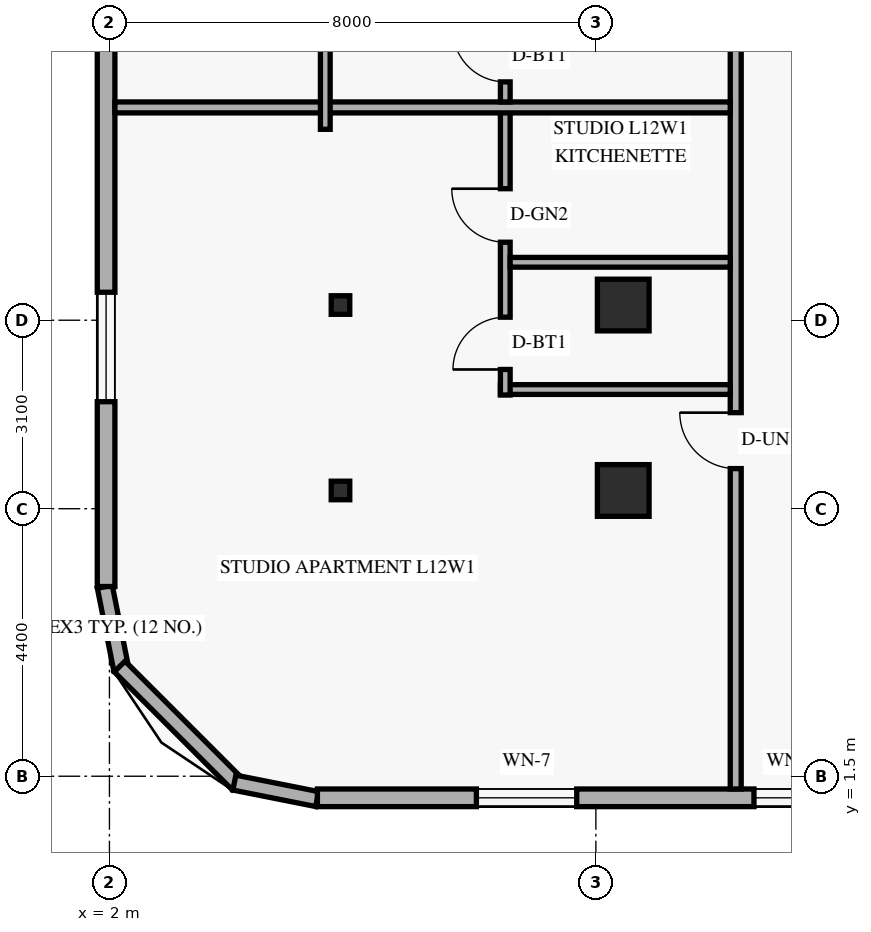
"""IFC4 building model, lengths in metres.
Left out: names, types, materials, properties, quantities, classifications, styles, units other than length and angle.
Written with IfcOpenShell. Run it as: python <this file> out.ifc"""

import sys

from ifc_helpers import new_model, si_unit, direction, frame, frame_2d, origin, origin_2d, place, context, subcontext, project, spatial, rectangle, hollow_rectangle, extrude, element, fill, save


model = new_model("IFC4")
c1 = context("Model", 3, precision=1e-05, world=origin(), true_north=direction((0.0, 1.0)))
c2 = subcontext(c1, "Body", "Model", "MODEL_VIEW")
j1 = project(units=[si_unit("LENGTHUNIT", "METRE"), si_unit("PLANEANGLEUNIT", "RADIAN")], contexts=[c1])
p1 = place(None, origin())
s1 = spatial("IfcSite", under=j1, at=p1, CompositionType="ELEMENT")
p2 = place(p1, origin())
s2 = spatial("IfcBuilding", under=s1, at=p2, CompositionType="ELEMENT")
p3 = place(p2, frame((0.0, 0.0, 49.2)))
s3 = spatial("IfcBuildingStorey", under=s2, at=p3, CompositionType="ELEMENT", Elevation=49.2)
for number, where, z_axis, x_axis in (
    (1, (5.8, 6.2, 0.0), (0.0, 0.0, 1.0), (1.0, 0.0, 0.0)),
    (2, (5.8, 9.25, 0.0), (0.0, 0.0, 1.0), (1.0, 0.0, 0.0)),
):
    element("IfcColumn", number, at=place(p3, frame(where, z_axis=z_axis, x_axis=x_axis)), inside=s3, PredefinedType="COLUMN", context=c2, shape_type="SweptSolid", body=[
        extrude(hollow_rectangle(XDim=0.305, YDim=0.305, WallThickness=0.013, at=origin_2d()), origin(), (0.0, 0.0, 1.0), 3.6),
    ])
for number, where, z_axis, x_axis in (
    (3, (10.45, 6.2, 0.0), (0.0, 0.0, 1.0), (1.0, 0.0, 0.0)),
    (4, (10.45, 9.25, 0.0), (0.0, 0.0, 1.0), (1.0, 0.0, 0.0)),
):
    element("IfcColumn", number, at=place(p3, frame(where, z_axis=z_axis, x_axis=x_axis)), inside=s3, PredefinedType="COLUMN", context=c2, shape_type="SweptSolid", body=[
        extrude(rectangle(XDim=0.85, YDim=0.85, at=origin_2d()), origin(), (0.0, 0.0, 1.0), 3.6),
    ])
p4 = place(p3, frame((1.924, 4.616, 0.0), z_axis=(0.0, 0.0, 1.0), x_axis=(0.19496651342, -0.980809899341, 0.0)))
e5 = element("IfcWall", 5, at=p4, inside=s3, PredefinedType="SOLIDWALL", context=c2, shape_type="SweptSolid", body=[
    extrude(rectangle(XDim=1.389, YDim=0.25, at=frame_2d((0.694, 0.0))), origin(), (0.0, 0.0, 1.0), 3.36),
])
p5 = place(p3, frame((2.168, 3.305, 0.0), z_axis=(0.0, 0.0, 1.0), x_axis=(0.707106781187, -0.707106781187, 0.0)))
e6 = element("IfcWall", 6, at=p5, inside=s3, PredefinedType="SOLIDWALL", context=c2, shape_type="SweptSolid", body=[
    extrude(rectangle(XDim=2.739, YDim=0.25, at=frame_2d((1.37, 0.0))), origin(), (0.0, 0.0, 1.0), 3.36),
])
p6 = place(p3, frame((4.054, 1.395, 0.0), z_axis=(0.0, 0.0, 1.0), x_axis=(0.980809899341, -0.19496651342, 0.0)))
e7 = element("IfcWall", 7, at=p6, inside=s3, PredefinedType="SOLIDWALL", context=c2, shape_type="SweptSolid", body=[
    extrude(rectangle(XDim=1.389, YDim=0.25, at=frame_2d((0.694, 0.0))), origin(), (0.0, 0.0, 1.0), 3.36),
])
p7 = place(p3, frame((5.42, 1.145, 0.0), z_axis=(0.0, 0.0, 1.0), x_axis=(1.0, 0.0, 0.0)))
e8 = element("IfcWall", 8, at=p7, inside=s3, PredefinedType="SOLIDWALL", context=c2, shape_type="SweptSolid", body=[
    extrude(rectangle(XDim=39.56, YDim=0.29, at=frame_2d((19.78, 0.0))), origin(), (0.0, 0.0, 1.0), 3.36),
])
p8 = place(p7, frame((2.615, 0.0, 0.85)))
e9 = element("IfcOpeningElement", 9, at=p8, cuts=e8, PredefinedType="OPENING", context=c2, shape_type="SweptSolid", body=[
    extrude(rectangle(XDim=1.65, YDim=1.6, at=frame_2d((0.825, 0.8))), frame((0.0, 0.155, 0.0), z_axis=(0.0, -1.0, 0.0), x_axis=(1.0, 0.0, 0.0)), (0.0, 0.0, 1.0), 0.31),
])
p9 = place(p7, frame((7.18, 0.0, 0.85)))
e10 = element("IfcOpeningElement", 10, at=p9, cuts=e8, PredefinedType="OPENING", context=c2, shape_type="SweptSolid", body=[
    extrude(rectangle(XDim=1.2, YDim=1.5, at=frame_2d((0.6, 0.75))), frame((0.0, 0.155, 0.0), z_axis=(0.0, -1.0, 0.0), x_axis=(1.0, 0.0, 0.0)), (0.0, 0.0, 1.0), 0.31),
])
p10 = place(p7, frame((11.906, 0.0, 0.85)))
e11 = element("IfcOpeningElement", 11, at=p10, cuts=e8, PredefinedType="OPENING", context=c2, shape_type="SweptSolid", body=[
    extrude(rectangle(XDim=1.65, YDim=1.6, at=frame_2d((0.825, 0.8))), frame((0.0, 0.155, 0.0), z_axis=(0.0, -1.0, 0.0), x_axis=(1.0, 0.0, 0.0)), (0.0, 0.0, 1.0), 0.31),
])
p11 = place(p7, frame((18.515, 0.0, 0.85)))
e12 = element("IfcOpeningElement", 12, at=p11, cuts=e8, PredefinedType="OPENING", context=c2, shape_type="SweptSolid", body=[
    extrude(rectangle(XDim=1.65, YDim=1.6, at=frame_2d((0.825, 0.8))), frame((0.0, 0.155, 0.0), z_axis=(0.0, -1.0, 0.0), x_axis=(1.0, 0.0, 0.0)), (0.0, 0.0, 1.0), 0.31),
])
p12 = place(p7, frame((25.124, 0.0, 0.85)))
e13 = element("IfcOpeningElement", 13, at=p12, cuts=e8, PredefinedType="OPENING", context=c2, shape_type="SweptSolid", body=[
    extrude(rectangle(XDim=1.65, YDim=1.6, at=frame_2d((0.825, 0.8))), frame((0.0, 0.155, 0.0), z_axis=(0.0, -1.0, 0.0), x_axis=(1.0, 0.0, 0.0)), (0.0, 0.0, 1.0), 0.31),
])
p13 = place(p7, frame((30.465, 0.0, 0.85)))
e14 = element("IfcOpeningElement", 14, at=p13, cuts=e8, PredefinedType="OPENING", context=c2, shape_type="SweptSolid", body=[
    extrude(rectangle(XDim=1.2, YDim=1.5, at=frame_2d((0.6, 0.75))), frame((0.0, 0.155, 0.0), z_axis=(0.0, -1.0, 0.0), x_axis=(1.0, 0.0, 0.0)), (0.0, 0.0, 1.0), 0.31),
])
p14 = place(p7, frame((32.613, 0.0, 0.85)))
e15 = element("IfcOpeningElement", 15, at=p14, cuts=e8, PredefinedType="OPENING", context=c2, shape_type="SweptSolid", body=[
    extrude(rectangle(XDim=1.65, YDim=1.6, at=frame_2d((0.825, 0.8))), frame((0.0, 0.155, 0.0), z_axis=(0.0, -1.0, 0.0), x_axis=(1.0, 0.0, 0.0)), (0.0, 0.0, 1.0), 0.31),
])
p15 = place(p7, frame((36.328, 0.0, 0.85)))
e16 = element("IfcOpeningElement", 16, at=p15, cuts=e8, PredefinedType="OPENING", context=c2, shape_type="SweptSolid", body=[
    extrude(rectangle(XDim=1.65, YDim=1.6, at=frame_2d((0.825, 0.8))), frame((0.0, 0.155, 0.0), z_axis=(0.0, -1.0, 0.0), x_axis=(1.0, 0.0, 0.0)), (0.0, 0.0, 1.0), 0.31),
])
p16 = place(p3, frame((1.945, 43.38, 0.0), z_axis=(0.0, 0.0, 1.0), x_axis=(0.0, -1.0, 0.0)))
e17 = element("IfcWall", 17, at=p16, inside=s3, PredefinedType="SOLIDWALL", context=c2, shape_type="SweptSolid", body=[
    extrude(rectangle(XDim=38.76, YDim=0.29, at=frame_2d((19.38, 0.0))), origin(), (0.0, 0.0, 1.0), 3.36),
])
p17 = place(p16, frame((33.92, 0.0, 0.85)))
e18 = element("IfcOpeningElement", 18, at=p17, cuts=e17, PredefinedType="OPENING", context=c2, shape_type="SweptSolid", body=[
    extrude(rectangle(XDim=1.8, YDim=1.6, at=frame_2d((0.9, 0.8))), frame((0.0, 0.155, 0.0), z_axis=(0.0, -1.0, 0.0), x_axis=(1.0, 0.0, 0.0)), (0.0, 0.0, 1.0), 0.31),
])
p18 = place(p16, frame((27.035, 0.0, 0.85)))
e19 = element("IfcOpeningElement", 19, at=p18, cuts=e17, PredefinedType="OPENING", context=c2, shape_type="SweptSolid", body=[
    extrude(rectangle(XDim=1.8, YDim=1.6, at=frame_2d((0.9, 0.8))), frame((0.0, 0.155, 0.0), z_axis=(0.0, -1.0, 0.0), x_axis=(1.0, 0.0, 0.0)), (0.0, 0.0, 1.0), 0.31),
])
p19 = place(p16, frame((20.825, 0.0, 0.85)))
e20 = element("IfcOpeningElement", 20, at=p19, cuts=e17, PredefinedType="OPENING", context=c2, shape_type="SweptSolid", body=[
    extrude(rectangle(XDim=1.8, YDim=1.6, at=frame_2d((0.9, 0.8))), frame((0.0, 0.155, 0.0), z_axis=(0.0, -1.0, 0.0), x_axis=(1.0, 0.0, 0.0)), (0.0, 0.0, 1.0), 0.31),
])
p20 = place(p16, frame((14.615, 0.0, 0.85)))
e21 = element("IfcOpeningElement", 21, at=p20, cuts=e17, PredefinedType="OPENING", context=c2, shape_type="SweptSolid", body=[
    extrude(rectangle(XDim=1.8, YDim=1.6, at=frame_2d((0.9, 0.8))), frame((0.0, 0.155, 0.0), z_axis=(0.0, -1.0, 0.0), x_axis=(1.0, 0.0, 0.0)), (0.0, 0.0, 1.0), 0.31),
])
p21 = place(p16, frame((8.635, 0.0, 0.85)))
e22 = element("IfcOpeningElement", 22, at=p21, cuts=e17, PredefinedType="OPENING", context=c2, shape_type="SweptSolid", body=[
    extrude(rectangle(XDim=1.8, YDim=1.6, at=frame_2d((0.9, 0.8))), frame((0.0, 0.155, 0.0), z_axis=(0.0, -1.0, 0.0), x_axis=(1.0, 0.0, 0.0)), (0.0, 0.0, 1.0), 0.31),
])
p22 = place(p16, frame((2.655, 0.0, 0.85)))
e23 = element("IfcOpeningElement", 23, at=p22, cuts=e17, PredefinedType="OPENING", context=c2, shape_type="SweptSolid", body=[
    extrude(rectangle(XDim=1.8, YDim=1.6, at=frame_2d((0.9, 0.8))), frame((0.0, 0.155, 0.0), z_axis=(0.0, -1.0, 0.0), x_axis=(1.0, 0.0, 0.0)), (0.0, 0.0, 1.0), 0.31),
])
p23 = place(p3, frame((12.3, 1.29, 0.0), z_axis=(0.0, 0.0, 1.0), x_axis=(0.0, 1.0, 0.0)))
e24 = element("IfcWall", 24, at=p23, inside=s3, PredefinedType="STANDARD", context=c2, shape_type="SweptSolid", body=[
    extrude(rectangle(XDim=45.42, YDim=0.18, at=frame_2d((22.71, 0.0))), origin(), (0.0, 0.0, 1.0), 2.649),
])
p24 = place(p23, frame((5.27, 0.0, 0.0)))
e25 = element("IfcOpeningElement", 25, at=p24, cuts=e24, PredefinedType="OPENING", context=c2, shape_type="SweptSolid", body=[
    extrude(rectangle(XDim=0.92, YDim=2.15, at=frame_2d((0.46, 1.075))), frame((0.0, 0.1, 0.0), z_axis=(0.0, -1.0, 0.0), x_axis=(1.0, 0.0, 0.0)), (0.0, 0.0, 1.0), 0.2),
])
p25 = place(p23, frame((16.21, 0.0, 0.0)))
e26 = element("IfcOpeningElement", 26, at=p25, cuts=e24, PredefinedType="OPENING", context=c2, shape_type="SweptSolid", body=[
    extrude(rectangle(XDim=0.92, YDim=2.15, at=frame_2d((0.46, 1.075))), frame((0.0, 0.1, 0.0), z_axis=(0.0, -1.0, 0.0), x_axis=(1.0, 0.0, 0.0)), (0.0, 0.0, 1.0), 0.2),
])
p26 = place(p23, frame((28.63, 0.0, 0.0)))
e27 = element("IfcOpeningElement", 27, at=p26, cuts=e24, PredefinedType="OPENING", context=c2, shape_type="SweptSolid", body=[
    extrude(rectangle(XDim=0.92, YDim=2.15, at=frame_2d((0.46, 1.075))), frame((0.0, 0.1, 0.0), z_axis=(0.0, -1.0, 0.0), x_axis=(1.0, 0.0, 0.0)), (0.0, 0.0, 1.0), 0.2),
])
p27 = place(p23, frame((40.59, 0.0, 0.0)))
e28 = element("IfcOpeningElement", 28, at=p27, cuts=e24, PredefinedType="OPENING", context=c2, shape_type="SweptSolid", body=[
    extrude(rectangle(XDim=0.92, YDim=2.15, at=frame_2d((0.46, 1.075))), frame((0.0, 0.1, 0.0), z_axis=(0.0, -1.0, 0.0), x_axis=(1.0, 0.0, 0.0)), (0.0, 0.0, 1.0), 0.2),
])
p28 = place(p3, frame((8.43, 7.86, 0.0), z_axis=(0.0, 0.0, 1.0), x_axis=(1.0, 0.0, 0.0)))
e29 = element("IfcWall", 29, at=p28, inside=s3, PredefinedType="PLUMBINGWALL", context=c2, shape_type="SweptSolid", body=[
    extrude(rectangle(XDim=3.78, YDim=0.16, at=frame_2d((1.89, 0.0))), origin(), (0.0, 0.0, 1.0), 2.649),
])
p29 = place(p3, frame((8.51, 7.77, 0.0), z_axis=(0.0, 0.0, 1.0), x_axis=(0.0, 1.0, 0.0)))
e30 = element("IfcWall", 30, at=p29, inside=s3, PredefinedType="PLUMBINGWALL", context=c2, shape_type="SweptSolid", body=[
    extrude(rectangle(XDim=4.73, YDim=0.16, at=frame_2d((2.365, 0.0))), origin(), (0.0, 0.0, 1.0), 2.649),
])
p30 = place(p29, frame((0.42, 0.0, 0.0)))
e31 = element("IfcOpeningElement", 31, at=p30, cuts=e30, PredefinedType="OPENING", context=c2, shape_type="SweptSolid", body=[
    extrude(rectangle(XDim=0.86, YDim=2.12, at=frame_2d((0.43, 1.06))), frame((0.0, 0.09, 0.0), z_axis=(0.0, -1.0, 0.0), x_axis=(1.0, 0.0, 0.0)), (0.0, 0.0, 1.0), 0.18),
])
p31 = place(p29, frame((2.513, 0.0, 0.0)))
e32 = element("IfcOpeningElement", 32, at=p31, cuts=e30, PredefinedType="OPENING", context=c2, shape_type="SweptSolid", body=[
    extrude(rectangle(XDim=0.88, YDim=2.12, at=frame_2d((0.44, 1.06))), frame((0.0, 0.09, 0.0), z_axis=(0.0, -1.0, 0.0), x_axis=(1.0, 0.0, 0.0)), (0.0, 0.0, 1.0), 0.18),
])
p32 = place(p3, frame((8.59, 9.953, 0.0), z_axis=(0.0, 0.0, 1.0), x_axis=(1.0, 0.0, 0.0)))
e33 = element("IfcWall", 33, at=p32, inside=s3, PredefinedType="PLUMBINGWALL", context=c2, shape_type="SweptSolid", body=[
    extrude(rectangle(XDim=3.62, YDim=0.16, at=frame_2d((1.81, 0.0))), origin(), (0.0, 0.0, 1.0), 2.649),
])
p33 = place(p3, frame((2.09, 12.5, 0.0), z_axis=(0.0, 0.0, 1.0), x_axis=(1.0, 0.0, 0.0)))
e34 = element("IfcWall", 34, at=p33, inside=s3, PredefinedType="PARTITIONING", context=c2, shape_type="SweptSolid", body=[
    extrude(rectangle(XDim=10.12, YDim=0.18, at=frame_2d((5.06, 0.0))), origin(), (0.0, 0.0, 1.0), 2.649),
])
p34 = place(p3, frame((8.51, 12.59, 0.0), z_axis=(0.0, 0.0, 1.0), x_axis=(0.0, 1.0, 0.0)))
e35 = element("IfcWall", 35, at=p34, inside=s3, PredefinedType="PLUMBINGWALL", context=c2, shape_type="SweptSolid", body=[
    extrude(rectangle(XDim=4.64, YDim=0.16, at=frame_2d((2.32, 0.0))), origin(), (0.0, 0.0, 1.0), 2.932),
])
p35 = place(p34, frame((0.33, 0.0, 0.0)))
e36 = element("IfcOpeningElement", 36, at=p35, cuts=e35, PredefinedType="OPENING", context=c2, shape_type="SweptSolid", body=[
    extrude(rectangle(XDim=0.86, YDim=2.12, at=frame_2d((0.43, 1.06))), frame((0.0, 0.09, 0.0), z_axis=(0.0, -1.0, 0.0), x_axis=(1.0, 0.0, 0.0)), (0.0, 0.0, 1.0), 0.18),
])
p36 = place(p34, frame((2.423, 0.0, 0.0)))
e37 = element("IfcOpeningElement", 37, at=p36, cuts=e35, PredefinedType="OPENING", context=c2, shape_type="SweptSolid", body=[
    extrude(rectangle(XDim=0.88, YDim=2.12, at=frame_2d((0.44, 1.06))), frame((0.0, 0.09, 0.0), z_axis=(0.0, -1.0, 0.0), x_axis=(1.0, 0.0, 0.0)), (0.0, 0.0, 1.0), 0.18),
])
p37 = place(p3, frame((5.55, 12.14, 0.0), z_axis=(0.0, 0.0, 1.0), x_axis=(0.0, 1.0, 0.0)))
e38 = element("IfcWall", 38, at=p37, inside=s3, PredefinedType="PARTITIONING", context=c2, shape_type="SweptSolid", body=[
    extrude(rectangle(XDim=6.25, YDim=0.16, at=frame_2d((3.125, 0.0))), origin(), (0.0, 0.0, 1.0), 3.36),
])
p38 = place(p8, origin())
e39 = element("IfcWindow", 39, at=p38, inside=s3, PartitioningType="SINGLE_PANEL", PredefinedType="WINDOW", context=c2, shape_type="SweptSolid", body=[
    extrude(rectangle(XDim=1.65, YDim=1.6, at=frame_2d((0.825, 0.8))), frame((0.0, 0.03, 0.0), z_axis=(0.0, -1.0, 0.0), x_axis=(1.0, 0.0, 0.0)), (0.0, 0.0, 1.0), 0.06),
])
fill(e9, e39)
p39 = place(p9, origin())
e40 = element("IfcWindow", 40, at=p39, inside=s3, PartitioningType="SINGLE_PANEL", PredefinedType="WINDOW", context=c2, shape_type="SweptSolid", body=[
    extrude(rectangle(XDim=1.2, YDim=1.5, at=frame_2d((0.6, 0.75))), frame((0.0, 0.03, 0.0), z_axis=(0.0, -1.0, 0.0), x_axis=(1.0, 0.0, 0.0)), (0.0, 0.0, 1.0), 0.06),
])
fill(e10, e40)
p40 = place(p17, origin())
e41 = element("IfcWindow", 41, at=p40, inside=s3, PartitioningType="SINGLE_PANEL", PredefinedType="WINDOW", context=c2, shape_type="SweptSolid", body=[
    extrude(rectangle(XDim=1.8, YDim=1.6, at=frame_2d((0.9, 0.8))), frame((0.0, 0.03, 0.0), z_axis=(0.0, -1.0, 0.0), x_axis=(1.0, 0.0, 0.0)), (0.0, 0.0, 1.0), 0.06),
])
fill(e18, e41)
p41 = place(p24, origin())
e42 = element("IfcDoor", 42, at=p41, inside=s3, OperationType="SINGLE_SWING_RIGHT", PredefinedType="DOOR", context=c2, shape_type="SweptSolid", body=[
    extrude(rectangle(XDim=0.92, YDim=2.15, at=frame_2d((0.46, 1.075))), frame((0.0, 0.025, 0.0), z_axis=(0.0, -1.0, 0.0), x_axis=(1.0, 0.0, 0.0)), (0.0, 0.0, 1.0), 0.05),
])
fill(e25, e42)
p42 = place(p30, origin())
e43 = element("IfcDoor", 43, at=p42, inside=s3, OperationType="SINGLE_SWING_LEFT", PredefinedType="DOOR", context=c2, shape_type="SweptSolid", body=[
    extrude(rectangle(XDim=0.86, YDim=2.12, at=frame_2d((0.43, 1.06))), frame((0.0, 0.025, 0.0), z_axis=(0.0, -1.0, 0.0), x_axis=(1.0, 0.0, 0.0)), (0.0, 0.0, 1.0), 0.05),
])
fill(e31, e43)
p43 = place(p31, origin())
e44 = element("IfcDoor", 44, at=p43, inside=s3, OperationType="SINGLE_SWING_RIGHT", PredefinedType="DOOR", context=c2, shape_type="SweptSolid", body=[
    extrude(rectangle(XDim=0.88, YDim=2.12, at=frame_2d((0.44, 1.06))), frame((0.0, 0.025, 0.0), z_axis=(0.0, -1.0, 0.0), x_axis=(1.0, 0.0, 0.0)), (0.0, 0.0, 1.0), 0.05),
])
fill(e32, e44)
p44 = place(p35, origin())
e45 = element("IfcDoor", 45, at=p44, inside=s3, OperationType="SINGLE_SWING_RIGHT", PredefinedType="DOOR", context=c2, shape_type="SweptSolid", body=[
    extrude(rectangle(XDim=0.86, YDim=2.12, at=frame_2d((0.43, 1.06))), frame((0.0, 0.025, 0.0), z_axis=(0.0, -1.0, 0.0), x_axis=(1.0, 0.0, 0.0)), (0.0, 0.0, 1.0), 0.05),
])
fill(e36, e45)
save(model, sys.argv[1])
